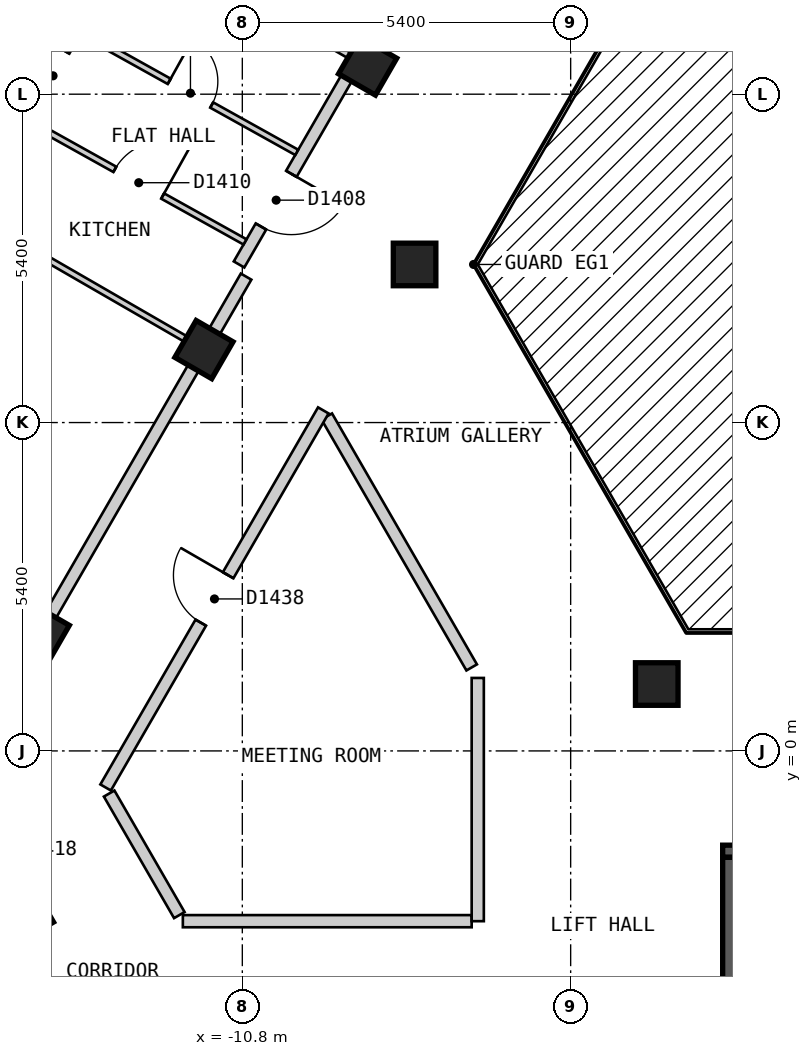
"""IFC4 building model, lengths in metres.
Left out: names, types, materials, properties, quantities, classifications, styles, units other than length and angle.
Written with IfcOpenShell. Run it as: python <this file> out.ifc"""

import sys

from ifc_helpers import new_model, si_unit, direction, frame, frame_2d, origin, origin_2d, place, context, subcontext, project, spatial, rectangle, extrude, element, fill, save


model = new_model("IFC4")
c1 = context("Model", 3, precision=1e-05, world=origin(), true_north=direction((0.0, 1.0)))
c2 = subcontext(c1, "Body", "Model", "MODEL_VIEW")
j1 = project(units=[si_unit("LENGTHUNIT", "METRE"), si_unit("PLANEANGLEUNIT", "RADIAN")], contexts=[c1])
p1 = place(None, origin())
s1 = spatial("IfcSite", under=j1, at=p1, CompositionType="ELEMENT")
p2 = place(p1, origin())
s2 = spatial("IfcBuilding", under=s1, at=p2, CompositionType="ELEMENT")
p3 = place(p2, frame((0.0, 0.0, 172.2)))
s3 = spatial("IfcBuildingStorey", under=s2, at=p3, CompositionType="ELEMENT", Elevation=172.2)
for number, where, z_axis, x_axis in (
    (1, (-14.383, -2.687, 0.0), (0.0, 0.0, 1.0), (0.5, -0.866, 0.0)),
    (2, (-8.739, 11.263, 0.0), (0.0, 0.0, 1.0), (-0.5, -0.866, 0.0)),
    (3, (-7.967, 8.0, 0.0), (0.0, 0.0, 1.0), (1.0, 0.0, 0.0)),
    (4, (-11.431, 6.6, 0.0), (0.0, 0.0, 1.0), (-0.5, -0.866, 0.0)),
    (5, (-3.984, 1.1, 0.0), (0.0, 0.0, 1.0), (1.0, 0.0, 0.0)),
    (6, (-14.123, 1.937, 0.0), (0.0, 0.0, 1.0), (-0.5, -0.866, 0.0)),
):
    element("IfcColumn", number, at=place(p3, frame(where, z_axis=z_axis, x_axis=x_axis)), inside=s3, PredefinedType="COLUMN", context=c2, shape_type="SweptSolid", body=[
        extrude(rectangle(XDim=0.7, YDim=0.7, at=origin_2d()), origin(), (0.0, 0.0, 1.0), 3.0),
    ])
p4 = place(p3, frame((-2.9, -1.65, 0.0), z_axis=(0.0, 0.0, 1.0), x_axis=(1.0, 0.0, 0.0)))
e7 = element("IfcWall", 7, at=p4, inside=s3, PredefinedType="SOLIDWALL", context=c2, shape_type="SweptSolid", body=[
    extrude(rectangle(XDim=5.8, YDim=0.2, at=frame_2d((2.9, 0.0))), origin(), (0.0, 0.0, 1.0), 2.7),
])
p5 = place(p4, frame((0.3, 0.0, 0.0)))
e8 = element("IfcOpeningElement", 8, at=p5, cuts=e7, PredefinedType="OPENING", context=c2, shape_type="SweptSolid", body=[
    extrude(rectangle(XDim=1.2, YDim=2.1, at=frame_2d((0.6, 1.05))), frame((0.0, 0.11, 0.0), z_axis=(0.0, -1.0, 0.0), x_axis=(1.0, 0.0, 0.0)), (0.0, 0.0, 1.0), 0.22),
])
p6 = place(p3, frame((-2.8, -4.5, 0.0), z_axis=(0.0, 0.0, 1.0), x_axis=(0.0, 1.0, 0.0)))
e9 = element("IfcWall", 9, at=p6, inside=s3, PredefinedType="SOLIDWALL", context=c2, shape_type="SweptSolid", body=[
    extrude(rectangle(XDim=2.75, YDim=0.2, at=frame_2d((1.375, 0.0))), origin(), (0.0, 0.0, 1.0), 2.7),
])
p7 = place(p3, frame((-9.411, 5.5, 0.0), z_axis=(0.0, 0.0, 1.0), x_axis=(0.500018099276, -0.86601495391, 0.0)))
e10 = element("IfcWall", 10, at=p7, inside=s3, PredefinedType="PARTITIONING", context=c2, shape_type="SweptSolid", body=[
    extrude(rectangle(XDim=4.765, YDim=0.2, at=frame_2d((2.383, 0.0))), origin(), (0.0, 0.0, 1.0), 2.7),
])
p8 = place(p3, frame((-12.99, -0.701, 0.0), z_axis=(0.0, 0.0, 1.0), x_axis=(0.499972710878, -0.866041158593, 0.0)))
e11 = element("IfcWall", 11, at=p8, inside=s3, PredefinedType="PARTITIONING", context=c2, shape_type="SweptSolid", body=[
    extrude(rectangle(XDim=2.308, YDim=0.2, at=frame_2d((1.154, 0.0))), origin(), (0.0, 0.0, 1.0), 2.7),
])
p9 = place(p3, frame((-11.778, -2.8, 0.0), z_axis=(0.0, 0.0, 1.0), x_axis=(1.0, 0.0, 0.0)))
e12 = element("IfcWall", 12, at=p9, inside=s3, PredefinedType="PARTITIONING", context=c2, shape_type="SweptSolid", body=[
    extrude(rectangle(XDim=4.75, YDim=0.2, at=frame_2d((2.375, 0.0))), origin(), (0.0, 0.0, 1.0), 2.7),
])
p10 = place(p3, frame((-13.048, -0.601, 0.0), z_axis=(0.0, 0.0, 1.0), x_axis=(0.499982180423, 0.866035691677, 0.0)))
e13 = element("IfcWall", 13, at=p10, inside=s3, PredefinedType="PARTITIONING", context=c2, shape_type="SweptSolid", body=[
    extrude(rectangle(XDim=7.16, YDim=0.2, at=frame_2d((3.58, 0.0))), origin(), (0.0, 0.0, 1.0), 2.7),
])
p11 = place(p10, frame((3.13, 0.0, 0.0)))
e14 = element("IfcOpeningElement", 14, at=p11, cuts=e13, PredefinedType="OPENING", context=c2, shape_type="SweptSolid", body=[
    extrude(rectangle(XDim=0.9, YDim=2.1, at=frame_2d((0.45, 1.05))), frame((0.0, 0.11, 0.0), z_axis=(0.0, -1.0, 0.0), x_axis=(1.0, 0.0, 0.0)), (0.0, 0.0, 1.0), 0.22),
])
p12 = place(p3, frame((-15.53, -0.501, 0.0), z_axis=(0.0, 0.0, 1.0), x_axis=(0.499952498232, 0.866052827206, 0.0)))
e15 = element("IfcWall", 15, at=p12, inside=s3, PredefinedType="PARTITIONING", context=c2, shape_type="SweptSolid", body=[
    extrude(rectangle(XDim=9.585, YDim=0.2, at=frame_2d((4.792, 0.0))), origin(), (0.0, 0.0, 1.0), 2.7),
])
p13 = place(p3, frame((-10.854, 8.0, 0.0), z_axis=(0.0, 0.0, 1.0), x_axis=(0.499997637144, 0.866026767976, 0.0)))
e16 = element("IfcWall", 16, at=p13, inside=s3, PredefinedType="PARTITIONING", context=c2, shape_type="SweptSolid", body=[
    extrude(rectangle(XDim=10.854, YDim=0.2, at=frame_2d((5.427, 0.0))), origin(), (0.0, 0.0, 1.0), 2.7),
])
p14 = place(p13, frame((0.721, 0.0, 0.0)))
e17 = element("IfcOpeningElement", 17, at=p14, cuts=e16, PredefinedType="OPENING", context=c2, shape_type="SweptSolid", body=[
    extrude(rectangle(XDim=1.0, YDim=2.1, at=frame_2d((0.5, 1.05))), frame((0.0, 0.11, 0.0), z_axis=(0.0, -1.0, 0.0), x_axis=(1.0, 0.0, 0.0)), (0.0, 0.0, 1.0), 0.22),
])
p15 = place(p3, frame((-6.928, -2.8, 0.0), z_axis=(0.0, 0.0, 1.0), x_axis=(0.0, 1.0, 0.0)))
e18 = element("IfcWall", 18, at=p15, inside=s3, PredefinedType="PARTITIONING", context=c2, shape_type="SweptSolid", body=[
    extrude(rectangle(XDim=4.0, YDim=0.2, at=frame_2d((2.0, 0.0))), origin(), (0.0, 0.0, 1.0), 2.7),
])
p16 = place(p3, frame((-13.444, 11.814, 0.0), z_axis=(0.0, 0.0, 1.0), x_axis=(0.873653620945, -0.486548405207, 0.0)))
e19 = element("IfcWall", 19, at=p16, inside=s3, PredefinedType="PARTITIONING", context=c2, shape_type="SweptSolid", body=[
    extrude(rectangle(XDim=4.051, YDim=0.1, at=frame_2d((2.025, 0.0))), origin(), (0.0, 0.0, 1.0), 2.7),
])
p17 = place(p16, frame((1.65, 0.0, 0.0)))
e20 = element("IfcOpeningElement", 20, at=p17, cuts=e19, PredefinedType="OPENING", context=c2, shape_type="SweptSolid", body=[
    extrude(rectangle(XDim=0.8, YDim=2.1, at=frame_2d((0.4, 1.05))), frame((0.0, 0.06, 0.0), z_axis=(0.0, -1.0, 0.0), x_axis=(1.0, 0.0, 0.0)), (0.0, 0.0, 1.0), 0.12),
])
p18 = place(p3, frame((-14.294, 10.342, 0.0), z_axis=(0.0, 0.0, 1.0), x_axis=(0.873582256032, -0.486676527013, 0.0)))
e21 = element("IfcWall", 21, at=p18, inside=s3, PredefinedType="PARTITIONING", context=c2, shape_type="SweptSolid", body=[
    extrude(rectangle(XDim=4.05, YDim=0.1, at=frame_2d((2.025, 0.0))), origin(), (0.0, 0.0, 1.0), 2.7),
])
p19 = place(p18, frame((1.6, 0.0, 0.0)))
e22 = element("IfcOpeningElement", 22, at=p19, cuts=e21, PredefinedType="OPENING", context=c2, shape_type="SweptSolid", body=[
    extrude(rectangle(XDim=0.9, YDim=2.1, at=frame_2d((0.45, 1.05))), frame((0.0, 0.06, 0.0), z_axis=(0.0, -1.0, 0.0), x_axis=(1.0, 0.0, 0.0)), (0.0, 0.0, 1.0), 0.12),
])
p20 = place(p3, frame((-15.199, 8.775, 0.0), z_axis=(0.0, 0.0, 1.0), x_axis=(0.866043063166, -0.499969411806, 0.0)))
e23 = element("IfcWall", 23, at=p20, inside=s3, PredefinedType="PARTITIONING", context=c2, shape_type="SweptSolid", body=[
    extrude(rectangle(XDim=4.25, YDim=0.1, at=frame_2d((2.125, 0.0))), origin(), (0.0, 0.0, 1.0), 2.7),
])
p21 = place(p3, frame((-15.704, 8.0, 0.0), z_axis=(0.0, 0.0, 1.0), x_axis=(0.500005637941, 0.866022148693, 0.0)))
e24 = element("IfcWall", 24, at=p21, inside=s3, PredefinedType="PARTITIONING", context=c2, shape_type="SweptSolid", body=[
    extrude(rectangle(XDim=11.592, YDim=0.1, at=frame_2d((5.796, 0.0))), origin(), (0.0, 0.0, 1.0), 2.7),
])
p22 = place(p21, frame((3.132, 0.0, 0.0)))
e25 = element("IfcOpeningElement", 25, at=p22, cuts=e24, PredefinedType="OPENING", context=c2, shape_type="SweptSolid", body=[
    extrude(rectangle(XDim=0.9, YDim=2.1, at=frame_2d((0.45, 1.05))), frame((0.0, 0.06, 0.0), z_axis=(0.0, -1.0, 0.0), x_axis=(1.0, 0.0, 0.0)), (0.0, 0.0, 1.0), 0.12),
])
p23 = place(p21, frame((8.6, 0.0, 0.0)))
e26 = element("IfcOpeningElement", 26, at=p23, cuts=e24, PredefinedType="OPENING", context=c2, shape_type="SweptSolid", body=[
    extrude(rectangle(XDim=0.8, YDim=2.1, at=frame_2d((0.4, 1.05))), frame((0.0, 0.06, 0.0), z_axis=(0.0, -1.0, 0.0), x_axis=(1.0, 0.0, 0.0)), (0.0, 0.0, 1.0), 0.12),
])
p24 = place(p3, frame((-12.55, 13.463, 0.0), z_axis=(0.0, 0.0, 1.0), x_axis=(0.86606561423, -0.499930346997, 0.0)))
e27 = element("IfcWall", 27, at=p24, inside=s3, PredefinedType="PARTITIONING", context=c2, shape_type="SweptSolid", body=[
    extrude(rectangle(XDim=4.1, YDim=0.1, at=frame_2d((2.05, 0.0))), origin(), (0.0, 0.0, 1.0), 2.7),
])
p25 = place(p14, origin())
e28 = element("IfcDoor", 28, at=p25, inside=s3, OperationType="SINGLE_SWING_RIGHT", PredefinedType="DOOR", context=c2, shape_type="SweptSolid", body=[
    extrude(rectangle(XDim=1.0, YDim=2.1, at=frame_2d((0.5, 1.05))), frame((0.0, 0.025, 0.0), z_axis=(0.0, -1.0, 0.0), x_axis=(1.0, 0.0, 0.0)), (0.0, 0.0, 1.0), 0.05),
])
fill(e17, e28)
p26 = place(p17, origin())
e29 = element("IfcDoor", 29, at=p26, inside=s3, OperationType="SINGLE_SWING_LEFT", PredefinedType="DOOR", context=c2, shape_type="SweptSolid", body=[
    extrude(rectangle(XDim=0.8, YDim=2.1, at=frame_2d((0.4, 1.05))), frame((0.0, 0.025, 0.0), z_axis=(0.0, -1.0, 0.0), x_axis=(1.0, 0.0, 0.0)), (0.0, 0.0, 1.0), 0.05),
])
fill(e20, e29)
p27 = place(p19, origin())
e30 = element("IfcDoor", 30, at=p27, inside=s3, OperationType="SINGLE_SWING_RIGHT", PredefinedType="DOOR", context=c2, shape_type="SweptSolid", body=[
    extrude(rectangle(XDim=0.9, YDim=2.1, at=frame_2d((0.45, 1.05))), frame((0.0, 0.025, 0.0), z_axis=(0.0, -1.0, 0.0), x_axis=(1.0, 0.0, 0.0)), (0.0, 0.0, 1.0), 0.05),
])
fill(e22, e30)
p28 = place(p22, origin())
e31 = element("IfcDoor", 31, at=p28, inside=s3, OperationType="SINGLE_SWING_LEFT", PredefinedType="DOOR", context=c2, shape_type="SweptSolid", body=[
    extrude(rectangle(XDim=0.9, YDim=2.1, at=frame_2d((0.45, 1.05))), frame((0.0, 0.025, 0.0), z_axis=(0.0, -1.0, 0.0), x_axis=(1.0, 0.0, 0.0)), (0.0, 0.0, 1.0), 0.05),
])
fill(e25, e31)
p29 = place(p11, origin())
e32 = element("IfcDoor", 32, at=p29, inside=s3, OperationType="SINGLE_SWING_RIGHT", PredefinedType="DOOR", context=c2, shape_type="SweptSolid", body=[
    extrude(rectangle(XDim=0.9, YDim=2.1, at=frame_2d((0.45, 1.05))), frame((0.0, 0.025, 0.0), z_axis=(0.0, -1.0, 0.0), x_axis=(1.0, 0.0, 0.0)), (0.0, 0.0, 1.0), 0.05),
])
fill(e14, e32)
save(model, sys.argv[1])
